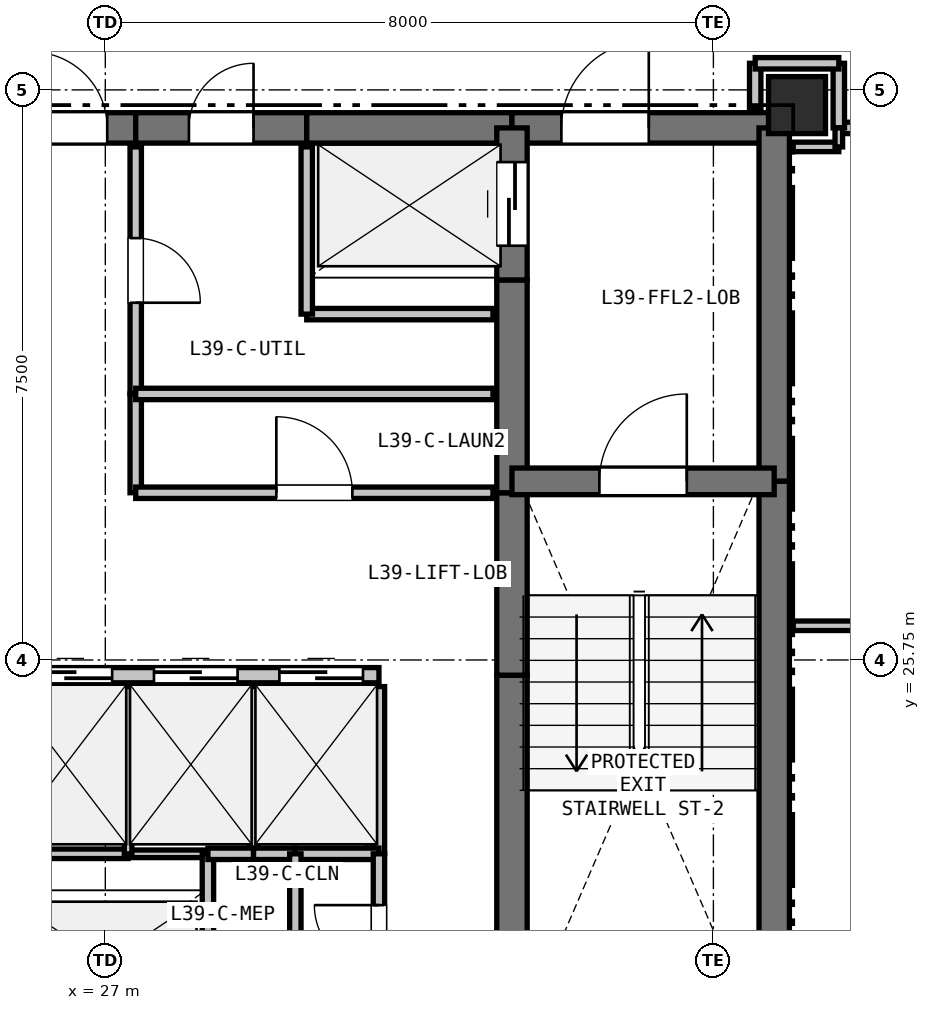
"""IFC4 building model, lengths in metres.
Left out: names, types, materials, properties, quantities, classifications, styles, units other than length and angle.
Written with IfcOpenShell. Run it as: python <this file> out.ifc"""

import sys

from ifc_helpers import new_model, si_unit, direction, frame, frame_2d, origin, origin_2d, place, context, subcontext, project, spatial, rectangle, extrude, element, fill, save


model = new_model("IFC4")
c1 = context("Model", 3, precision=1e-05, world=origin(), true_north=direction((0.0, 1.0)))
c2 = subcontext(c1, "Body", "Model", "MODEL_VIEW")
j1 = project(units=[si_unit("LENGTHUNIT", "METRE"), si_unit("PLANEANGLEUNIT", "RADIAN")], contexts=[c1])
p1 = place(None, origin())
s1 = spatial("IfcSite", under=j1, at=p1, CompositionType="ELEMENT")
p2 = place(p1, origin())
s2 = spatial("IfcBuilding", under=s1, at=p2, CompositionType="ELEMENT")
p3 = place(p2, frame((0.0, 0.0, 141.0)))
s3 = spatial("IfcBuildingStorey", under=s2, at=p3, CompositionType="ELEMENT", Elevation=141.0)
p4 = place(p3, frame((36.1, 33.05, 0.0), z_axis=(0.0, 0.0, 1.0), x_axis=(1.0, 0.0, 0.0)))
e1 = element("IfcColumn", 1, at=p4, inside=s3, PredefinedType="COLUMN", context=c2, shape_type="SweptSolid", body=[
    extrude(rectangle(XDim=0.75, YDim=0.75, at=origin_2d()), origin(), (0.0, 0.0, 1.0), 3.3),
])
p5 = place(p3, frame((25.65, 32.75, 0.0), z_axis=(0.0, 0.0, 1.0), x_axis=(1.0, 0.0, 0.0)))
e2 = element("IfcWall", 2, at=p5, inside=s3, PredefinedType="SHEAR", context=c2, shape_type="SweptSolid", body=[
    extrude(rectangle(XDim=1.75, YDim=0.4, at=frame_2d((0.875, 0.0))), origin(), (0.0, 0.0, 1.0), 3.06),
])
p6 = place(p5, frame((0.375, 0.0, 0.0)))
e3 = element("IfcOpeningElement", 3, at=p6, cuts=e2, PredefinedType="OPENING", context=c2, shape_type="SweptSolid", body=[
    extrude(rectangle(XDim=1.0, YDim=2.15, at=frame_2d((0.5, 1.075))), frame((0.0, 0.21, 0.0), z_axis=(0.0, -1.0, 0.0), x_axis=(1.0, 0.0, 0.0)), (0.0, 0.0, 1.0), 0.42),
])
p7 = place(p3, frame((27.4, 32.75, 0.0), z_axis=(0.0, 0.0, 1.0), x_axis=(1.0, 0.0, 0.0)))
e4 = element("IfcWall", 4, at=p7, inside=s3, PredefinedType="SHEAR", context=c2, shape_type="SweptSolid", body=[
    extrude(rectangle(XDim=2.25, YDim=0.4, at=frame_2d((1.125, 0.0))), origin(), (0.0, 0.0, 1.0), 3.06),
])
p8 = place(p7, frame((0.7, 0.0, 0.0)))
e5 = element("IfcOpeningElement", 5, at=p8, cuts=e4, PredefinedType="OPENING", context=c2, shape_type="SweptSolid", body=[
    extrude(rectangle(XDim=0.85, YDim=2.1, at=frame_2d((0.425, 1.05))), frame((0.0, 0.21, 0.0), z_axis=(0.0, -1.0, 0.0), x_axis=(1.0, 0.0, 0.0)), (0.0, 0.0, 1.0), 0.42),
])
p9 = place(p3, frame((29.65, 32.75, 0.0), z_axis=(0.0, 0.0, 1.0), x_axis=(1.0, 0.0, 0.0)))
e6 = element("IfcWall", 6, at=p9, inside=s3, PredefinedType="SHEAR", context=c2, shape_type="SweptSolid", body=[
    extrude(rectangle(XDim=2.7, YDim=0.4, at=frame_2d((1.35, 0.0))), origin(), (0.0, 0.0, 1.0), 3.06),
])
p10 = place(p3, frame((32.35, 32.75, 0.0), z_axis=(0.0, 0.0, 1.0), x_axis=(1.0, 0.0, 0.0)))
e7 = element("IfcWall", 7, at=p10, inside=s3, PredefinedType="SHEAR", context=c2, shape_type="SweptSolid", body=[
    extrude(rectangle(XDim=3.45, YDim=0.4, at=frame_2d((1.725, 0.0))), origin(), (0.0, 0.0, 1.0), 3.06),
])
p11 = place(p10, frame((0.65, 0.0, 0.0)))
e8 = element("IfcOpeningElement", 8, at=p11, cuts=e7, PredefinedType="OPENING", context=c2, shape_type="SweptSolid", body=[
    extrude(rectangle(XDim=1.15, YDim=2.15, at=frame_2d((0.575, 1.075))), frame((0.0, 0.21, 0.0), z_axis=(0.0, -1.0, 0.0), x_axis=(1.0, 0.0, 0.0)), (0.0, 0.0, 1.0), 0.42),
])
p12 = place(p3, frame((35.8, 32.75, 0.0), z_axis=(0.0, 0.0, 1.0), x_axis=(0.0, -1.0, 0.0)))
e9 = element("IfcWall", 9, at=p12, inside=s3, PredefinedType="SHEAR", context=c2, shape_type="SweptSolid", body=[
    extrude(rectangle(XDim=4.65, YDim=0.4, at=frame_2d((2.325, 0.0))), origin(), (0.0, 0.0, 1.0), 3.06),
])
p13 = place(p3, frame((35.8, 28.1, 0.0), z_axis=(0.0, 0.0, 1.0), x_axis=(0.0, -1.0, 0.0)))
e10 = element("IfcWall", 10, at=p13, inside=s3, PredefinedType="SHEAR", context=c2, shape_type="SweptSolid", body=[
    extrude(rectangle(XDim=7.35, YDim=0.4, at=frame_2d((3.675, 0.0))), origin(), (0.0, 0.0, 1.0), 3.06),
])
p14 = place(p3, frame((32.35, 20.75, 0.0), z_axis=(0.0, 0.0, 1.0), x_axis=(0.0, 1.0, 0.0)))
e11 = element("IfcWall", 11, at=p14, inside=s3, PredefinedType="SHEAR", context=c2, shape_type="SweptSolid", body=[
    extrude(rectangle(XDim=4.8, YDim=0.4, at=frame_2d((2.4, 0.0))), origin(), (0.0, 0.0, 1.0), 3.06),
])
p15 = place(p3, frame((32.35, 25.55, 0.0), z_axis=(0.0, 0.0, 1.0), x_axis=(0.0, 1.0, 0.0)))
e12 = element("IfcWall", 12, at=p15, inside=s3, PredefinedType="SHEAR", context=c2, shape_type="SweptSolid", body=[
    extrude(rectangle(XDim=2.4, YDim=0.4, at=frame_2d((1.2, 0.0))), origin(), (0.0, 0.0, 1.0), 3.06),
])
p16 = place(p3, frame((32.35, 27.95, 0.0), z_axis=(0.0, 0.0, 1.0), x_axis=(0.0, 1.0, 0.0)))
e13 = element("IfcWall", 13, at=p16, inside=s3, PredefinedType="SHEAR", context=c2, shape_type="SweptSolid", body=[
    extrude(rectangle(XDim=2.8, YDim=0.4, at=frame_2d((1.4, 0.0))), origin(), (0.0, 0.0, 1.0), 3.06),
])
p17 = place(p3, frame((32.35, 30.75, 0.0), z_axis=(0.0, 0.0, 1.0), x_axis=(0.0, 1.0, 0.0)))
e14 = element("IfcWall", 14, at=p17, inside=s3, PredefinedType="SHEAR", context=c2, shape_type="SweptSolid", body=[
    extrude(rectangle(XDim=2.0, YDim=0.4, at=frame_2d((1.0, 0.0))), origin(), (0.0, 0.0, 1.0), 3.06),
])
p18 = place(p17, frame((0.45, 0.0, 0.0)))
e15 = element("IfcOpeningElement", 15, at=p18, cuts=e14, PredefinedType="OPENING", context=c2, shape_type="SweptSolid", body=[
    extrude(rectangle(XDim=1.1, YDim=2.15, at=frame_2d((0.55, 1.075))), frame((0.0, 0.21, 0.0), z_axis=(0.0, -1.0, 0.0), x_axis=(1.0, 0.0, 0.0)), (0.0, 0.0, 1.0), 0.42),
])
p19 = place(p3, frame((32.35, 28.1, 0.0), z_axis=(0.0, 0.0, 1.0), x_axis=(1.0, 0.0, 0.0)))
e16 = element("IfcWall", 16, at=p19, inside=s3, PredefinedType="SHEAR", context=c2, shape_type="SweptSolid", body=[
    extrude(rectangle(XDim=3.45, YDim=0.35, at=frame_2d((1.725, 0.0))), origin(), (0.0, 0.0, 1.0), 3.06),
])
p20 = place(p19, frame((1.15, 0.0, 0.0)))
e17 = element("IfcOpeningElement", 17, at=p20, cuts=e16, PredefinedType="OPENING", context=c2, shape_type="SweptSolid", body=[
    extrude(rectangle(XDim=1.15, YDim=2.15, at=frame_2d((0.575, 1.075))), frame((0.0, 0.185, 0.0), z_axis=(0.0, -1.0, 0.0), x_axis=(1.0, 0.0, 0.0)), (0.0, 0.0, 1.0), 0.37),
])
p21 = place(p3, frame((25.65, 25.55, 0.0), z_axis=(0.0, 0.0, 1.0), x_axis=(1.0, 0.0, 0.0)))
e18 = element("IfcWall", 18, at=p21, inside=s3, PredefinedType="PARTITIONING", context=c2, shape_type="SweptSolid", body=[
    extrude(rectangle(XDim=4.95, YDim=0.2, at=frame_2d((2.475, 0.0))), origin(), (0.0, 0.0, 1.0), 3.06),
])
p22 = place(p21, frame((0.34, 0.0, 0.0)))
e19 = element("IfcOpeningElement", 19, at=p22, cuts=e18, PredefinedType="OPENING", context=c2, shape_type="SweptSolid", body=[
    extrude(rectangle(XDim=1.1, YDim=2.15, at=frame_2d((0.55, 1.075))), frame((0.0, 0.11, 0.0), z_axis=(0.0, -1.0, 0.0), x_axis=(1.0, 0.0, 0.0)), (0.0, 0.0, 1.0), 0.22),
])
p23 = place(p21, frame((1.99, 0.0, 0.0)))
e20 = element("IfcOpeningElement", 20, at=p23, cuts=e18, PredefinedType="OPENING", context=c2, shape_type="SweptSolid", body=[
    extrude(rectangle(XDim=1.1, YDim=2.15, at=frame_2d((0.55, 1.075))), frame((0.0, 0.11, 0.0), z_axis=(0.0, -1.0, 0.0), x_axis=(1.0, 0.0, 0.0)), (0.0, 0.0, 1.0), 0.22),
])
p24 = place(p21, frame((3.64, 0.0, 0.0)))
e21 = element("IfcOpeningElement", 21, at=p24, cuts=e18, PredefinedType="OPENING", context=c2, shape_type="SweptSolid", body=[
    extrude(rectangle(XDim=1.1, YDim=2.15, at=frame_2d((0.55, 1.075))), frame((0.0, 0.11, 0.0), z_axis=(0.0, -1.0, 0.0), x_axis=(1.0, 0.0, 0.0)), (0.0, 0.0, 1.0), 0.22),
])
p25 = place(p3, frame((25.9, 23.2, 0.0), z_axis=(0.0, 0.0, 1.0), x_axis=(1.0, 0.0, 0.0)))
e22 = element("IfcWall", 22, at=p25, inside=s3, PredefinedType="PARTITIONING", context=c2, shape_type="SweptSolid", body=[
    extrude(rectangle(XDim=1.4, YDim=0.125, at=frame_2d((0.7, 0.0))), origin(), (0.0, 0.0, 1.0), 3.06),
])
p26 = place(p3, frame((27.3, 23.2, 0.0), z_axis=(0.0, 0.0, 1.0), x_axis=(1.0, 0.0, 0.0)))
e23 = element("IfcWall", 23, at=p26, inside=s3, PredefinedType="PARTITIONING", context=c2, shape_type="SweptSolid", body=[
    extrude(rectangle(XDim=1.05, YDim=0.1, at=frame_2d((0.525, 0.0))), origin(), (0.0, 0.0, 1.0), 3.06),
])
p27 = place(p3, frame((28.35, 23.2, 0.0), z_axis=(0.0, 0.0, 1.0), x_axis=(0.0, -1.0, 0.0)))
e24 = element("IfcWall", 24, at=p27, inside=s3, PredefinedType="PARTITIONING", context=c2, shape_type="SweptSolid", body=[
    extrude(rectangle(XDim=2.2, YDim=0.15, at=frame_2d((1.1, 0.0))), origin(), (0.0, 0.0, 1.0), 3.06),
])
p28 = place(p3, frame((32.1, 30.3, 0.0), z_axis=(0.0, 0.0, 1.0), x_axis=(-1.0, 0.0, 0.0)))
e25 = element("IfcWall", 25, at=p28, inside=s3, PredefinedType="PARTITIONING", context=c2, shape_type="SweptSolid", body=[
    extrude(rectangle(XDim=2.45, YDim=0.15, at=frame_2d((1.225, 0.0))), origin(), (0.0, 0.0, 1.0), 3.06),
])
p29 = place(p3, frame((29.65, 30.3, 0.0), z_axis=(0.0, 0.0, 1.0), x_axis=(0.0, 1.0, 0.0)))
e26 = element("IfcWall", 26, at=p29, inside=s3, PredefinedType="PARTITIONING", context=c2, shape_type="SweptSolid", body=[
    extrude(rectangle(XDim=2.2, YDim=0.15, at=frame_2d((1.1, 0.0))), origin(), (0.0, 0.0, 1.0), 3.06),
])
p30 = place(p3, frame((27.3, 25.4, 0.0), z_axis=(0.0, 0.0, 1.0), x_axis=(0.0, -1.0, 0.0)))
e27 = element("IfcWall", 27, at=p30, inside=s3, PredefinedType="PARTITIONING", context=c2, shape_type="SweptSolid", body=[
    extrude(rectangle(XDim=2.2, YDim=0.1, at=frame_2d((1.1, 0.0))), origin(), (0.0, 0.0, 1.0), 3.06),
])
p31 = place(p3, frame((28.95, 25.4, 0.0), z_axis=(0.0, 0.0, 1.0), x_axis=(0.0, -1.0, 0.0)))
e28 = element("IfcWall", 28, at=p31, inside=s3, PredefinedType="PARTITIONING", context=c2, shape_type="SweptSolid", body=[
    extrude(rectangle(XDim=2.2, YDim=0.125, at=frame_2d((1.1, 0.0))), origin(), (0.0, 0.0, 1.0), 3.06),
])
p32 = place(p3, frame((28.95, 23.2, 0.0), z_axis=(0.0, 0.0, 1.0), x_axis=(-1.0, 0.0, 0.0)))
e29 = element("IfcWall", 29, at=p32, inside=s3, PredefinedType="PARTITIONING", context=c2, shape_type="SweptSolid", body=[
    extrude(rectangle(XDim=0.6, YDim=0.15, at=frame_2d((0.3, 0.0))), origin(), (0.0, 0.0, 1.0), 3.06),
])
p33 = place(p3, frame((30.6, 25.4, 0.0), z_axis=(0.0, 0.0, 1.0), x_axis=(0.0, -1.0, 0.0)))
e30 = element("IfcWall", 30, at=p33, inside=s3, PredefinedType="PARTITIONING", context=c2, shape_type="SweptSolid", body=[
    extrude(rectangle(XDim=2.2, YDim=0.15, at=frame_2d((1.1, 0.0))), origin(), (0.0, 0.0, 1.0), 3.06),
])
p34 = place(p3, frame((30.6, 23.2, 0.0), z_axis=(0.0, 0.0, 1.0), x_axis=(-1.0, 0.0, 0.0)))
e31 = element("IfcWall", 31, at=p34, inside=s3, PredefinedType="PARTITIONING", context=c2, shape_type="SweptSolid", body=[
    extrude(rectangle(XDim=1.1, YDim=0.15, at=frame_2d((0.55, 0.0))), origin(), (0.0, 0.0, 1.0), 3.06),
])
p35 = place(p3, frame((29.5, 23.2, 0.0), z_axis=(0.0, 0.0, 1.0), x_axis=(-1.0, 0.0, 0.0)))
e32 = element("IfcWall", 32, at=p35, inside=s3, PredefinedType="PARTITIONING", context=c2, shape_type="SweptSolid", body=[
    extrude(rectangle(XDim=0.55, YDim=0.15, at=frame_2d((0.275, 0.0))), origin(), (0.0, 0.0, 1.0), 3.06),
])
p36 = place(p3, frame((30.6, 21.0, 0.0), z_axis=(0.0, 0.0, 1.0), x_axis=(0.0, 1.0, 0.0)))
e33 = element("IfcWall", 33, at=p36, inside=s3, PredefinedType="PARTITIONING", context=c2, shape_type="SweptSolid", body=[
    extrude(rectangle(XDim=2.2, YDim=0.15, at=frame_2d((1.1, 0.0))), origin(), (0.0, 0.0, 1.0), 3.06),
])
p37 = place(p36, frame((0.675, 0.0, 0.0)))
e34 = element("IfcOpeningElement", 34, at=p37, cuts=e33, PredefinedType="OPENING", context=c2, shape_type="SweptSolid", body=[
    extrude(rectangle(XDim=0.85, YDim=2.1, at=frame_2d((0.425, 1.05))), frame((0.0, 0.085, 0.0), z_axis=(0.0, -1.0, 0.0), x_axis=(1.0, 0.0, 0.0)), (0.0, 0.0, 1.0), 0.17),
])
p38 = place(p3, frame((27.4, 32.5, 0.0), z_axis=(0.0, 0.0, 1.0), x_axis=(0.0, -1.0, 0.0)))
e35 = element("IfcWall", 35, at=p38, inside=s3, PredefinedType="PARTITIONING", context=c2, shape_type="SweptSolid", body=[
    extrude(rectangle(XDim=3.25, YDim=0.15, at=frame_2d((1.625, 0.0))), origin(), (0.0, 0.0, 1.0), 3.06),
])
p39 = place(p38, frame((1.2, 0.0, 0.0)))
e36 = element("IfcOpeningElement", 36, at=p39, cuts=e35, PredefinedType="OPENING", context=c2, shape_type="SweptSolid", body=[
    extrude(rectangle(XDim=0.85, YDim=2.1, at=frame_2d((0.425, 1.05))), frame((0.0, 0.085, 0.0), z_axis=(0.0, -1.0, 0.0), x_axis=(1.0, 0.0, 0.0)), (0.0, 0.0, 1.0), 0.17),
])
p40 = place(p3, frame((27.4, 29.25, 0.0), z_axis=(0.0, 0.0, 1.0), x_axis=(0.0, -1.0, 0.0)))
e37 = element("IfcWall", 37, at=p40, inside=s3, PredefinedType="PARTITIONING", context=c2, shape_type="SweptSolid", body=[
    extrude(rectangle(XDim=1.3, YDim=0.15, at=frame_2d((0.65, 0.0))), origin(), (0.0, 0.0, 1.0), 3.06),
])
p41 = place(p3, frame((27.4, 27.95, 0.0), z_axis=(0.0, 0.0, 1.0), x_axis=(1.0, 0.0, 0.0)))
e38 = element("IfcWall", 38, at=p41, inside=s3, PredefinedType="PARTITIONING", context=c2, shape_type="SweptSolid", body=[
    extrude(rectangle(XDim=4.7, YDim=0.15, at=frame_2d((2.35, 0.0))), origin(), (0.0, 0.0, 1.0), 3.06),
])
p42 = place(p41, frame((1.85, 0.0, 0.0)))
e39 = element("IfcOpeningElement", 39, at=p42, cuts=e38, PredefinedType="OPENING", context=c2, shape_type="SweptSolid", body=[
    extrude(rectangle(XDim=1.0, YDim=2.15, at=frame_2d((0.5, 1.075))), frame((0.0, 0.085, 0.0), z_axis=(0.0, -1.0, 0.0), x_axis=(1.0, 0.0, 0.0)), (0.0, 0.0, 1.0), 0.17),
])
p43 = place(p3, frame((35.55, 33.6, 0.0), z_axis=(0.0, 0.0, 1.0), x_axis=(0.0, -1.0, 0.0)))
e40 = element("IfcWall", 40, at=p43, inside=s3, PredefinedType="PARTITIONING", context=c2, shape_type="SweptSolid", body=[
    extrude(rectangle(XDim=0.6, YDim=0.15, at=frame_2d((0.3, 0.0))), origin(), (0.0, 0.0, 1.0), 2.585),
])
p44 = place(p3, frame((39.2, 32.75, 0.0), z_axis=(0.0, 0.0, 1.0), x_axis=(-1.0, 0.0, 0.0)))
e41 = element("IfcWall", 41, at=p44, inside=s3, PredefinedType="PARTITIONING", context=c2, shape_type="SweptSolid", body=[
    extrude(rectangle(XDim=2.55, YDim=0.15, at=frame_2d((1.275, 0.0))), origin(), (0.0, 0.0, 1.0), 3.06),
])
p45 = place(p44, frame((0.775, 0.0, 0.0)))
e42 = element("IfcOpeningElement", 42, at=p45, cuts=e41, PredefinedType="OPENING", context=c2, shape_type="SweptSolid", body=[
    extrude(rectangle(XDim=1.0, YDim=2.15, at=frame_2d((0.5, 1.075))), frame((0.0, 0.085, 0.0), z_axis=(0.0, -1.0, 0.0), x_axis=(1.0, 0.0, 0.0)), (0.0, 0.0, 1.0), 0.17),
])
p46 = place(p3, frame((36.65, 32.75, 0.0), z_axis=(0.0, 0.0, 1.0), x_axis=(0.0, 1.0, 0.0)))
e43 = element("IfcWall", 43, at=p46, inside=s3, PredefinedType="PARTITIONING", context=c2, shape_type="SweptSolid", body=[
    extrude(rectangle(XDim=0.85, YDim=0.15, at=frame_2d((0.425, 0.0))), origin(), (0.0, 0.0, 1.0), 2.433),
])
p47 = place(p3, frame((36.65, 33.6, 0.0), z_axis=(0.0, 0.0, 1.0), x_axis=(-1.0, 0.0, 0.0)))
e44 = element("IfcWall", 44, at=p47, inside=s3, PredefinedType="PARTITIONING", context=c2, shape_type="SweptSolid", body=[
    extrude(rectangle(XDim=1.1, YDim=0.15, at=frame_2d((0.55, 0.0))), origin(), (0.0, 0.0, 1.0), 2.433),
])
p48 = place(p3, frame((32.1, 29.25, 0.0), z_axis=(0.0, 0.0, 1.0), x_axis=(-1.0, 0.0, 0.0)))
e45 = element("IfcWall", 45, at=p48, inside=s3, PredefinedType="PARTITIONING", context=c2, shape_type="SweptSolid", body=[
    extrude(rectangle(XDim=4.7, YDim=0.15, at=frame_2d((2.35, 0.0))), origin(), (0.0, 0.0, 1.0), 3.06),
])
p49 = place(p3, frame((29.5, 23.2, 0.0), z_axis=(0.0, 0.0, 1.0), x_axis=(0.0, -1.0, 0.0)))
e46 = element("IfcWall", 46, at=p49, inside=s3, PredefinedType="PARTITIONING", context=c2, shape_type="SweptSolid", body=[
    extrude(rectangle(XDim=2.2, YDim=0.15, at=frame_2d((1.1, 0.0))), origin(), (0.0, 0.0, 1.0), 3.06),
])
p50 = place(p3, frame((36.05, 32.5, 0.0), z_axis=(0.0, 0.0, 1.0), x_axis=(1.0, 0.0, 0.0)))
e47 = element("IfcWall", 47, at=p50, inside=s3, PredefinedType="PARTITIONING", context=c2, shape_type="SweptSolid", body=[
    extrude(rectangle(XDim=0.6, YDim=0.125, at=frame_2d((0.3, 0.0))), origin(), (0.0, 0.0, 1.0), 2.585),
])
p51 = place(p3, frame((36.65, 32.5, 0.0), z_axis=(0.0, 0.0, 1.0), x_axis=(0.0, 1.0, 0.0)))
e48 = element("IfcWall", 48, at=p51, inside=s3, PredefinedType="PARTITIONING", context=c2, shape_type="SweptSolid", body=[
    extrude(rectangle(XDim=0.25, YDim=0.1, at=frame_2d((0.125, 0.0))), origin(), (0.0, 0.0, 1.0), 3.06),
])
p52 = place(p3, frame((42.181, 26.2, 0.0), z_axis=(0.0, 0.0, 1.0), x_axis=(-1.0, 0.0, 0.0)))
e49 = element("IfcWall", 49, at=p52, inside=s3, PredefinedType="PARTITIONING", context=c2, shape_type="SweptSolid", body=[
    extrude(rectangle(XDim=6.131, YDim=0.125, at=frame_2d((3.065, 0.0))), origin(), (0.0, 0.0, 1.0), 2.365),
])
p53 = place(p22, origin())
e50 = element("IfcDoor", 50, at=p53, inside=s3, OperationType="SLIDING_TO_LEFT", PredefinedType="DOOR", context=c2, shape_type="SweptSolid", body=[
    extrude(rectangle(XDim=1.1, YDim=2.15, at=frame_2d((0.55, 1.075))), frame((0.0, 0.025, 0.0), z_axis=(0.0, -1.0, 0.0), x_axis=(1.0, 0.0, 0.0)), (0.0, 0.0, 1.0), 0.05),
])
fill(e19, e50)
p54 = place(p23, origin())
e51 = element("IfcDoor", 51, at=p54, inside=s3, OperationType="SLIDING_TO_LEFT", PredefinedType="DOOR", context=c2, shape_type="SweptSolid", body=[
    extrude(rectangle(XDim=1.1, YDim=2.15, at=frame_2d((0.55, 1.075))), frame((0.0, 0.025, 0.0), z_axis=(0.0, -1.0, 0.0), x_axis=(1.0, 0.0, 0.0)), (0.0, 0.0, 1.0), 0.05),
])
fill(e20, e51)
p55 = place(p24, origin())
e52 = element("IfcDoor", 52, at=p55, inside=s3, OperationType="SLIDING_TO_LEFT", PredefinedType="DOOR", context=c2, shape_type="SweptSolid", body=[
    extrude(rectangle(XDim=1.1, YDim=2.15, at=frame_2d((0.55, 1.075))), frame((0.0, 0.025, 0.0), z_axis=(0.0, -1.0, 0.0), x_axis=(1.0, 0.0, 0.0)), (0.0, 0.0, 1.0), 0.05),
])
fill(e21, e52)
p56 = place(p6, origin())
e53 = element("IfcDoor", 53, at=p56, inside=s3, OperationType="SINGLE_SWING_LEFT", PredefinedType="DOOR", context=c2, shape_type="SweptSolid", body=[
    extrude(rectangle(XDim=1.0, YDim=2.15, at=frame_2d((0.5, 1.075))), frame((0.0, 0.025, 0.0), z_axis=(0.0, -1.0, 0.0), x_axis=(1.0, 0.0, 0.0)), (0.0, 0.0, 1.0), 0.05),
])
fill(e3, e53)
p57 = place(p18, origin())
e54 = element("IfcDoor", 54, at=p57, inside=s3, OperationType="SLIDING_TO_LEFT", PredefinedType="DOOR", context=c2, shape_type="SweptSolid", body=[
    extrude(rectangle(XDim=1.1, YDim=2.15, at=frame_2d((0.55, 1.075))), frame((0.0, 0.025, 0.0), z_axis=(0.0, -1.0, 0.0), x_axis=(1.0, 0.0, 0.0)), (0.0, 0.0, 1.0), 0.05),
])
fill(e15, e54)
p58 = place(p20, origin())
e55 = element("IfcDoor", 55, at=p58, inside=s3, OperationType="SINGLE_SWING_RIGHT", PredefinedType="DOOR", context=c2, shape_type="SweptSolid", body=[
    extrude(rectangle(XDim=1.15, YDim=2.15, at=frame_2d((0.575, 1.075))), frame((0.0, 0.025, 0.0), z_axis=(0.0, -1.0, 0.0), x_axis=(1.0, 0.0, 0.0)), (0.0, 0.0, 1.0), 0.05),
])
fill(e17, e55)
p59 = place(p11, origin())
e56 = element("IfcDoor", 56, at=p59, inside=s3, OperationType="SINGLE_SWING_RIGHT", PredefinedType="DOOR", context=c2, shape_type="SweptSolid", body=[
    extrude(rectangle(XDim=1.15, YDim=2.15, at=frame_2d((0.575, 1.075))), frame((0.0, 0.025, 0.0), z_axis=(0.0, -1.0, 0.0), x_axis=(1.0, 0.0, 0.0)), (0.0, 0.0, 1.0), 0.05),
])
fill(e8, e56)
p60 = place(p39, origin())
e57 = element("IfcDoor", 57, at=p60, inside=s3, OperationType="SINGLE_SWING_RIGHT", PredefinedType="DOOR", context=c2, shape_type="SweptSolid", body=[
    extrude(rectangle(XDim=0.85, YDim=2.1, at=frame_2d((0.425, 1.05))), frame((0.0, 0.025, 0.0), z_axis=(0.0, -1.0, 0.0), x_axis=(1.0, 0.0, 0.0)), (0.0, 0.0, 1.0), 0.05),
])
fill(e36, e57)
p61 = place(p42, origin())
e58 = element("IfcDoor", 58, at=p61, inside=s3, OperationType="SINGLE_SWING_LEFT", PredefinedType="DOOR", context=c2, shape_type="SweptSolid", body=[
    extrude(rectangle(XDim=1.0, YDim=2.15, at=frame_2d((0.5, 1.075))), frame((0.0, 0.025, 0.0), z_axis=(0.0, -1.0, 0.0), x_axis=(1.0, 0.0, 0.0)), (0.0, 0.0, 1.0), 0.05),
])
fill(e39, e58)
p62 = place(p37, origin())
e59 = element("IfcDoor", 59, at=p62, inside=s3, OperationType="SINGLE_SWING_RIGHT", PredefinedType="DOOR", context=c2, shape_type="SweptSolid", body=[
    extrude(rectangle(XDim=0.85, YDim=2.1, at=frame_2d((0.425, 1.05))), frame((0.0, 0.025, 0.0), z_axis=(0.0, -1.0, 0.0), x_axis=(1.0, 0.0, 0.0)), (0.0, 0.0, 1.0), 0.05),
])
fill(e34, e59)
p63 = place(p8, origin())
e60 = element("IfcDoor", 60, at=p63, inside=s3, OperationType="SINGLE_SWING_RIGHT", PredefinedType="DOOR", context=c2, shape_type="SweptSolid", body=[
    extrude(rectangle(XDim=0.85, YDim=2.1, at=frame_2d((0.425, 1.05))), frame((0.0, 0.025, 0.0), z_axis=(0.0, -1.0, 0.0), x_axis=(1.0, 0.0, 0.0)), (0.0, 0.0, 1.0), 0.05),
])
fill(e5, e60)
save(model, sys.argv[1])
